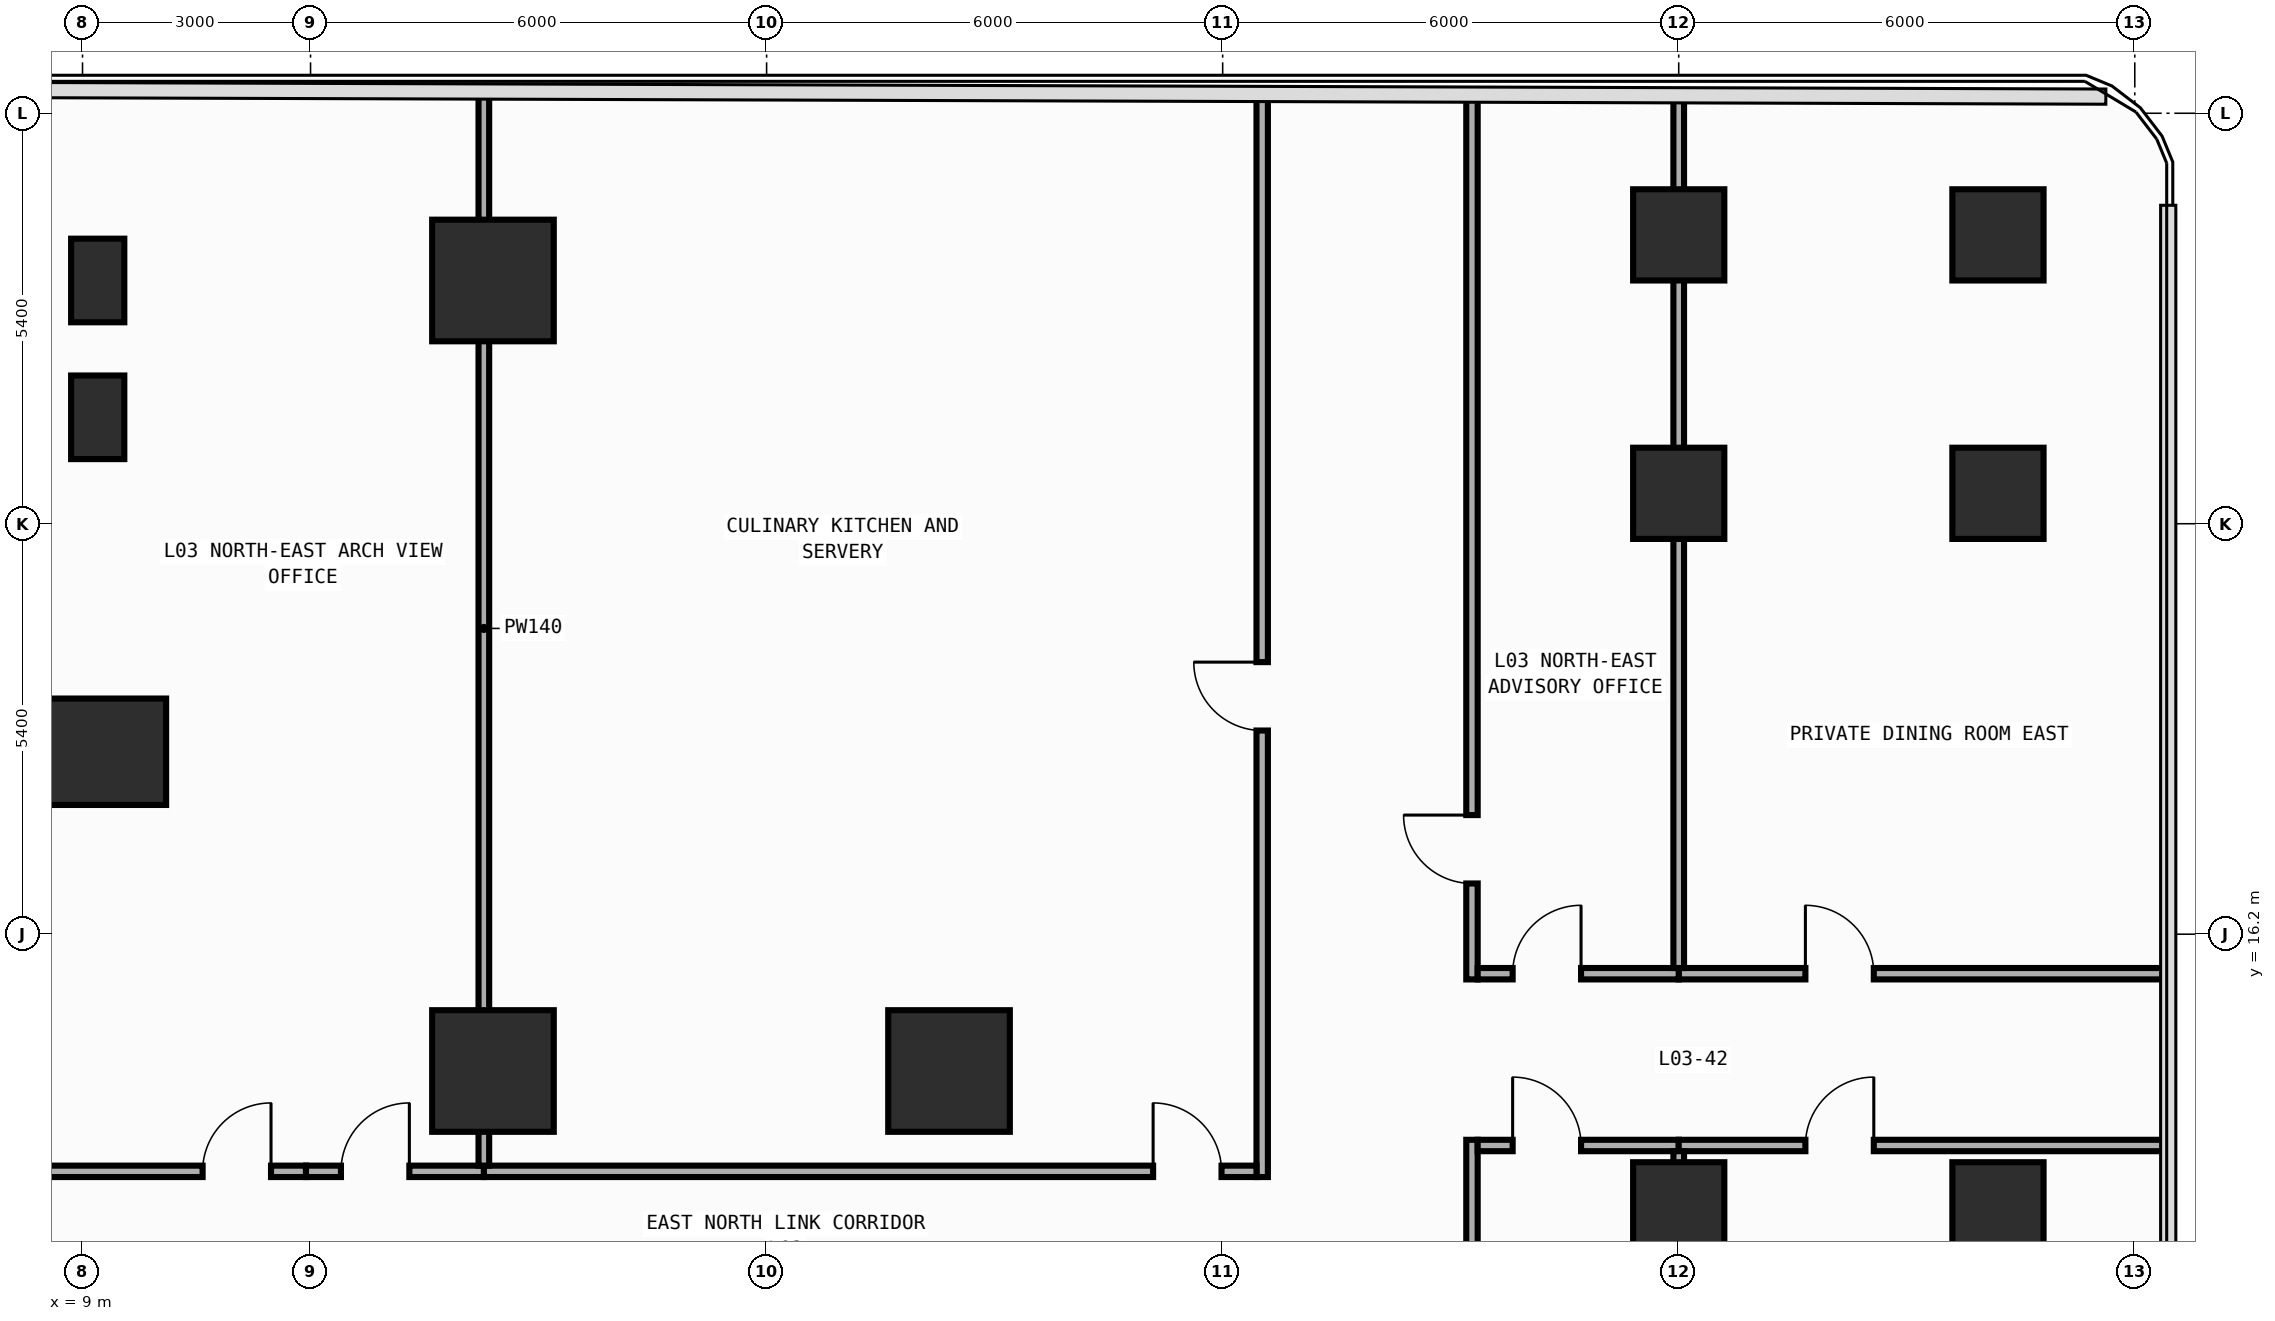
"""IFC4 building model, lengths in metres.
Left out: names, types, materials, properties, quantities, classifications, styles, units other than length and angle.
Written with IfcOpenShell. Run it as: python <this file> out.ifc"""

import sys

from ifc_helpers import new_model, si_unit, direction, frame, frame_2d, origin, origin_2d, place, context, subcontext, project, spatial, rectangle, extrude, element, fill, save


model = new_model("IFC4")
c1 = context("Model", 3, precision=1e-05, world=origin(), true_north=direction((0.0, 1.0)))
c2 = subcontext(c1, "Body", "Model", "MODEL_VIEW")
j1 = project(units=[si_unit("LENGTHUNIT", "METRE"), si_unit("PLANEANGLEUNIT", "RADIAN")], contexts=[c1])
p1 = place(None, origin())
s1 = spatial("IfcSite", under=j1, at=p1, CompositionType="ELEMENT")
p2 = place(p1, origin())
s2 = spatial("IfcBuilding", under=s1, at=p2, CompositionType="ELEMENT")
p3 = place(p2, frame((0.0, 0.0, 11.0)))
s3 = spatial("IfcBuildingStorey", under=s2, at=p3, CompositionType="ELEMENT", Elevation=11.0)
p4 = place(p3, frame((9.2, 18.6, 0.0), z_axis=(0.0, 0.0, 1.0), x_axis=(1.0, 0.0, 0.0)))
e1 = element("IfcColumn", 1, at=p4, inside=s3, PredefinedType="COLUMN", context=c2, shape_type="SweptSolid", body=[
    extrude(rectangle(XDim=1.8, YDim=1.4, at=origin_2d()), origin(), (0.0, 0.0, 1.0), 5.0),
])
for number, where, z_axis, x_axis in (
    (2, (20.4, 14.4, 0.0), (0.0, 0.0, 1.0), (1.0, 0.0, 0.0)),
    (3, (14.4, 14.4, 0.0), (0.0, 0.0, 1.0), (1.0, 0.0, 0.0)),
):
    element("IfcColumn", number, at=place(p3, frame(where, z_axis=z_axis, x_axis=x_axis)), inside=s3, PredefinedType="COLUMN", context=c2, shape_type="SweptSolid", body=[
        extrude(rectangle(XDim=1.6, YDim=1.6, at=origin_2d()), origin(), (0.0, 0.0, 1.0), 5.0),
    ])
for number, where, z_axis, x_axis in (
    (4, (30.0, 12.6, 0.0), (0.0, 0.0, 1.0), (1.0, 0.0, 0.0)),
    (5, (30.0, 22.0, 0.0), (0.0, 0.0, 1.0), (1.0, 0.0, 0.0)),
    (6, (30.0, 25.4, 0.0), (0.0, 0.0, 1.0), (1.0, 0.0, 0.0)),
    (7, (34.2, 12.6, 0.0), (0.0, 0.0, 1.0), (1.0, 0.0, 0.0)),
    (8, (34.2, 22.0, 0.0), (0.0, 0.0, 1.0), (1.0, 0.0, 0.0)),
    (9, (34.2, 25.4, 0.0), (0.0, 0.0, 1.0), (1.0, 0.0, 0.0)),
):
    element("IfcColumn", number, at=place(p3, frame(where, z_axis=z_axis, x_axis=x_axis)), inside=s3, PredefinedType="COLUMN", context=c2, shape_type="SweptSolid", body=[
        extrude(rectangle(XDim=1.2, YDim=1.2, at=origin_2d()), origin(), (0.0, 0.0, 1.0), 5.0),
    ])
p5 = place(p3, frame((9.2, 24.8, 0.0), z_axis=(0.0, 0.0, 1.0), x_axis=(1.0, 0.0, 0.0)))
e10 = element("IfcColumn", 10, at=p5, inside=s3, PredefinedType="PILASTER", context=c2, shape_type="SweptSolid", body=[
    extrude(rectangle(XDim=0.7, YDim=1.1, at=origin_2d()), origin(), (0.0, 0.0, 1.0), 5.0),
])
p6 = place(p3, frame((14.4, 24.8, 0.0), z_axis=(0.0, 0.0, 1.0), x_axis=(1.0, 0.0, 0.0)))
e11 = element("IfcColumn", 11, at=p6, inside=s3, PredefinedType="COLUMN", context=c2, shape_type="SweptSolid", body=[
    extrude(rectangle(XDim=1.6, YDim=1.6, at=origin_2d()), origin(), (0.0, 0.0, 1.0), 5.0),
])
p7 = place(p3, frame((9.2, 23.0, 0.0), z_axis=(0.0, 0.0, 1.0), x_axis=(1.0, 0.0, 0.0)))
e12 = element("IfcColumn", 12, at=p7, inside=s3, PredefinedType="PILASTER", context=c2, shape_type="SweptSolid", body=[
    extrude(rectangle(XDim=0.7, YDim=1.1, at=origin_2d()), origin(), (0.0, 0.0, 1.0), 5.0),
])
p8 = place(p3, frame((8.205, 13.08, 0.0), z_axis=(0.0, 0.0, 1.0), x_axis=(1.0, 0.0, 0.0)))
e13 = element("IfcWall", 13, at=p8, inside=s3, PredefinedType="PARTITIONING", context=c2, shape_type="SweptSolid", body=[
    extrude(rectangle(XDim=3.735, YDim=0.15, at=frame_2d((1.867, 0.0))), origin(), (0.0, 0.0, 1.0), 4.7),
])
p9 = place(p8, frame((2.375, 0.0, 0.0)))
e14 = element("IfcOpeningElement", 14, at=p9, cuts=e13, PredefinedType="OPENING", context=c2, shape_type="SweptSolid", body=[
    extrude(rectangle(XDim=0.9, YDim=2.15, at=frame_2d((0.45, 1.075))), frame((0.0, 0.085, 0.0), z_axis=(0.0, -1.0, 0.0), x_axis=(1.0, 0.0, 0.0)), (0.0, 0.0, 1.0), 0.17),
])
p10 = place(p3, frame((27.28, 5.365, 0.0), z_axis=(0.0, 0.0, 1.0), x_axis=(0.0, 1.0, 0.0)))
e15 = element("IfcWall", 15, at=p10, inside=s3, PredefinedType="PARTITIONING", context=c2, shape_type="SweptSolid", body=[
    extrude(rectangle(XDim=8.13, YDim=0.15, at=frame_2d((4.065, 0.0))), origin(), (0.0, 0.0, 1.0), 4.7),
])
p11 = place(p10, frame((3.31, 0.0, 0.0)))
e16 = element("IfcOpeningElement", 16, at=p11, cuts=e15, PredefinedType="OPENING", context=c2, shape_type="SweptSolid", body=[
    extrude(rectangle(XDim=0.9, YDim=2.15, at=frame_2d((0.45, 1.075))), frame((0.0, 0.085, 0.0), z_axis=(0.0, -1.0, 0.0), x_axis=(1.0, 0.0, 0.0)), (0.0, 0.0, 1.0), 0.17),
])
p12 = place(p3, frame((24.52, 13.005, 0.0), z_axis=(0.0, 0.0, 1.0), x_axis=(0.0, 1.0, 0.0)))
e17 = element("IfcWall", 17, at=p12, inside=s3, PredefinedType="PARTITIONING", context=c2, shape_type="SweptSolid", body=[
    extrude(rectangle(XDim=14.253, YDim=0.15, at=frame_2d((7.126, 0.0))), origin(), (0.0, 0.0, 1.0), 4.7),
])
p13 = place(p12, frame((5.874, 0.0, 0.0)))
e18 = element("IfcOpeningElement", 18, at=p13, cuts=e17, PredefinedType="OPENING", context=c2, shape_type="SweptSolid", body=[
    extrude(rectangle(XDim=0.9, YDim=2.15, at=frame_2d((0.45, 1.075))), frame((0.0, 0.085, 0.0), z_axis=(0.0, -1.0, 0.0), x_axis=(1.0, 0.0, 0.0)), (0.0, 0.0, 1.0), 0.17),
])
p14 = place(p3, frame((27.28, 15.605, 0.0), z_axis=(0.0, 0.0, 1.0), x_axis=(0.0, 1.0, 0.0)))
e19 = element("IfcWall", 19, at=p14, inside=s3, PredefinedType="PARTITIONING", context=c2, shape_type="SweptSolid", body=[
    extrude(rectangle(XDim=11.644, YDim=0.15, at=frame_2d((5.822, 0.0))), origin(), (0.0, 0.0, 1.0), 4.7),
])
p15 = place(p14, frame((1.262, 0.0, 0.0)))
e20 = element("IfcOpeningElement", 20, at=p15, cuts=e19, PredefinedType="OPENING", context=c2, shape_type="SweptSolid", body=[
    extrude(rectangle(XDim=0.9, YDim=2.15, at=frame_2d((0.45, 1.075))), frame((0.0, 0.085, 0.0), z_axis=(0.0, -1.0, 0.0), x_axis=(1.0, 0.0, 0.0)), (0.0, 0.0, 1.0), 0.17),
])
p16 = place(p3, frame((27.355, 13.42, 0.0), z_axis=(0.0, 0.0, 1.0), x_axis=(1.0, 0.0, 0.0)))
e21 = element("IfcWall", 21, at=p16, inside=s3, PredefinedType="PARTITIONING", context=c2, shape_type="SweptSolid", body=[
    extrude(rectangle(XDim=2.645, YDim=0.15, at=frame_2d((1.323, 0.0))), origin(), (0.0, 0.0, 1.0), 4.7),
])
p17 = place(p16, frame((0.46, 0.0, 0.0)))
e22 = element("IfcOpeningElement", 22, at=p17, cuts=e21, PredefinedType="OPENING", context=c2, shape_type="SweptSolid", body=[
    extrude(rectangle(XDim=0.9, YDim=2.15, at=frame_2d((0.45, 1.075))), frame((0.0, 0.085, 0.0), z_axis=(0.0, -1.0, 0.0), x_axis=(1.0, 0.0, 0.0)), (0.0, 0.0, 1.0), 0.17),
])
p18 = place(p3, frame((30.0, 13.42, 0.0), z_axis=(0.0, 0.0, 1.0), x_axis=(1.0, 0.0, 0.0)))
e23 = element("IfcWall", 23, at=p18, inside=s3, PredefinedType="PARTITIONING", context=c2, shape_type="SweptSolid", body=[
    extrude(rectangle(XDim=6.445, YDim=0.15, at=frame_2d((3.223, 0.0))), origin(), (0.0, 0.0, 1.0), 4.7),
])
p19 = place(p18, frame((1.667, 0.0, 0.0)))
e24 = element("IfcOpeningElement", 24, at=p19, cuts=e23, PredefinedType="OPENING", context=c2, shape_type="SweptSolid", body=[
    extrude(rectangle(XDim=0.9, YDim=2.15, at=frame_2d((0.45, 1.075))), frame((0.0, 0.085, 0.0), z_axis=(0.0, -1.0, 0.0), x_axis=(1.0, 0.0, 0.0)), (0.0, 0.0, 1.0), 0.17),
])
p20 = place(p3, frame((30.0, 15.68, 0.0), z_axis=(0.0, 0.0, 1.0), x_axis=(1.0, 0.0, 0.0)))
e25 = element("IfcWall", 25, at=p20, inside=s3, PredefinedType="PARTITIONING", context=c2, shape_type="SweptSolid", body=[
    extrude(rectangle(XDim=6.445, YDim=0.15, at=frame_2d((3.223, 0.0))), origin(), (0.0, 0.0, 1.0), 4.7),
])
p21 = place(p20, frame((1.667, 0.0, 0.0)))
e26 = element("IfcOpeningElement", 26, at=p21, cuts=e25, PredefinedType="OPENING", context=c2, shape_type="SweptSolid", body=[
    extrude(rectangle(XDim=0.9, YDim=2.15, at=frame_2d((0.45, 1.075))), frame((0.0, 0.085, 0.0), z_axis=(0.0, -1.0, 0.0), x_axis=(1.0, 0.0, 0.0)), (0.0, 0.0, 1.0), 0.17),
])
p22 = place(p3, frame((27.355, 15.68, 0.0), z_axis=(0.0, 0.0, 1.0), x_axis=(1.0, 0.0, 0.0)))
e27 = element("IfcWall", 27, at=p22, inside=s3, PredefinedType="PARTITIONING", context=c2, shape_type="SweptSolid", body=[
    extrude(rectangle(XDim=2.645, YDim=0.15, at=frame_2d((1.323, 0.0))), origin(), (0.0, 0.0, 1.0), 4.7),
])
p23 = place(p22, frame((0.46, 0.0, 0.0)))
e28 = element("IfcOpeningElement", 28, at=p23, cuts=e27, PredefinedType="OPENING", context=c2, shape_type="SweptSolid", body=[
    extrude(rectangle(XDim=0.9, YDim=2.15, at=frame_2d((0.45, 1.075))), frame((0.0, 0.085, 0.0), z_axis=(0.0, -1.0, 0.0), x_axis=(1.0, 0.0, 0.0)), (0.0, 0.0, 1.0), 0.17),
])
p24 = place(p3, frame((14.28, 13.08, 0.0), z_axis=(0.0, 0.0, 1.0), x_axis=(1.0, 0.0, 0.0)))
e29 = element("IfcWall", 29, at=p24, inside=s3, PredefinedType="PARTITIONING", context=c2, shape_type="SweptSolid", body=[
    extrude(rectangle(XDim=10.165, YDim=0.15, at=frame_2d((5.083, 0.0))), origin(), (0.0, 0.0, 1.0), 4.7),
])
p25 = place(p24, frame((8.805, 0.0, 0.0)))
e30 = element("IfcOpeningElement", 30, at=p25, cuts=e29, PredefinedType="OPENING", context=c2, shape_type="SweptSolid", body=[
    extrude(rectangle(XDim=0.9, YDim=2.15, at=frame_2d((0.45, 1.075))), frame((0.0, 0.085, 0.0), z_axis=(0.0, -1.0, 0.0), x_axis=(1.0, 0.0, 0.0)), (0.0, 0.0, 1.0), 0.17),
])
p26 = place(p3, frame((11.94, 13.08, 0.0), z_axis=(0.0, 0.0, 1.0), x_axis=(1.0, 0.0, 0.0)))
e31 = element("IfcWall", 31, at=p26, inside=s3, PredefinedType="PARTITIONING", context=c2, shape_type="SweptSolid", body=[
    extrude(rectangle(XDim=2.34, YDim=0.15, at=frame_2d((1.17, 0.0))), origin(), (0.0, 0.0, 1.0), 4.7),
])
p27 = place(p26, frame((0.46, 0.0, 0.0)))
e32 = element("IfcOpeningElement", 32, at=p27, cuts=e31, PredefinedType="OPENING", context=c2, shape_type="SweptSolid", body=[
    extrude(rectangle(XDim=0.9, YDim=2.15, at=frame_2d((0.45, 1.075))), frame((0.0, 0.085, 0.0), z_axis=(0.0, -1.0, 0.0), x_axis=(1.0, 0.0, 0.0)), (0.0, 0.0, 1.0), 0.17),
])
p28 = place(p3, frame((30.0, 5.515, 0.0), z_axis=(0.0, 0.0, 1.0), x_axis=(0.0, 1.0, 0.0)))
e33 = element("IfcWall", 33, at=p28, inside=s3, PredefinedType="PARTITIONING", context=c2, shape_type="SweptSolid", body=[
    extrude(rectangle(XDim=7.83, YDim=0.14, at=frame_2d((3.915, 0.0))), origin(), (0.0, 0.0, 1.0), 3.8),
])
p29 = place(p3, frame((30.0, 15.755, 0.0), z_axis=(0.0, 0.0, 1.0), x_axis=(0.0, 1.0, 0.0)))
e34 = element("IfcWall", 34, at=p29, inside=s3, PredefinedType="PARTITIONING", context=c2, shape_type="SweptSolid", body=[
    extrude(rectangle(XDim=11.486, YDim=0.14, at=frame_2d((5.743, 0.0))), origin(), (0.0, 0.0, 1.0), 3.8),
])
p30 = place(p3, frame((14.28, 13.155, 0.0), z_axis=(0.0, 0.0, 1.0), x_axis=(0.0, 1.0, 0.0)))
e35 = element("IfcWall", 35, at=p30, inside=s3, PredefinedType="PARTITIONING", context=c2, shape_type="SweptSolid", body=[
    extrude(rectangle(XDim=14.135, YDim=0.14, at=frame_2d((7.067, 0.0))), origin(), (0.0, 0.0, 1.0), 3.8),
])
p31 = place(p9, origin())
e36 = element("IfcDoor", 36, at=p31, inside=s3, OperationType="SINGLE_SWING_RIGHT", PredefinedType="DOOR", context=c2, shape_type="SweptSolid", body=[
    extrude(rectangle(XDim=0.9, YDim=2.15, at=frame_2d((0.45, 1.075))), frame((0.0, 0.025, 0.0), z_axis=(0.0, -1.0, 0.0), x_axis=(1.0, 0.0, 0.0)), (0.0, 0.0, 1.0), 0.05),
])
fill(e14, e36)
p32 = place(p13, origin())
e37 = element("IfcDoor", 37, at=p32, inside=s3, OperationType="SINGLE_SWING_RIGHT", PredefinedType="DOOR", context=c2, shape_type="SweptSolid", body=[
    extrude(rectangle(XDim=0.9, YDim=2.15, at=frame_2d((0.45, 1.075))), frame((0.0, 0.025, 0.0), z_axis=(0.0, -1.0, 0.0), x_axis=(1.0, 0.0, 0.0)), (0.0, 0.0, 1.0), 0.05),
])
fill(e18, e37)
p33 = place(p15, origin())
e38 = element("IfcDoor", 38, at=p33, inside=s3, OperationType="SINGLE_SWING_RIGHT", PredefinedType="DOOR", context=c2, shape_type="SweptSolid", body=[
    extrude(rectangle(XDim=0.9, YDim=2.15, at=frame_2d((0.45, 1.075))), frame((0.0, 0.025, 0.0), z_axis=(0.0, -1.0, 0.0), x_axis=(1.0, 0.0, 0.0)), (0.0, 0.0, 1.0), 0.05),
])
fill(e20, e38)
p34 = place(p17, origin())
e39 = element("IfcDoor", 39, at=p34, inside=s3, OperationType="SINGLE_SWING_LEFT", PredefinedType="DOOR", context=c2, shape_type="SweptSolid", body=[
    extrude(rectangle(XDim=0.9, YDim=2.15, at=frame_2d((0.45, 1.075))), frame((0.0, 0.025, 0.0), z_axis=(0.0, -1.0, 0.0), x_axis=(1.0, 0.0, 0.0)), (0.0, 0.0, 1.0), 0.05),
])
fill(e22, e39)
p35 = place(p19, origin())
e40 = element("IfcDoor", 40, at=p35, inside=s3, OperationType="SINGLE_SWING_RIGHT", PredefinedType="DOOR", context=c2, shape_type="SweptSolid", body=[
    extrude(rectangle(XDim=0.9, YDim=2.15, at=frame_2d((0.45, 1.075))), frame((0.0, 0.025, 0.0), z_axis=(0.0, -1.0, 0.0), x_axis=(1.0, 0.0, 0.0)), (0.0, 0.0, 1.0), 0.05),
])
fill(e24, e40)
p36 = place(p21, origin())
e41 = element("IfcDoor", 41, at=p36, inside=s3, OperationType="SINGLE_SWING_LEFT", PredefinedType="DOOR", context=c2, shape_type="SweptSolid", body=[
    extrude(rectangle(XDim=0.9, YDim=2.15, at=frame_2d((0.45, 1.075))), frame((0.0, 0.025, 0.0), z_axis=(0.0, -1.0, 0.0), x_axis=(1.0, 0.0, 0.0)), (0.0, 0.0, 1.0), 0.05),
])
fill(e26, e41)
p37 = place(p23, origin())
e42 = element("IfcDoor", 42, at=p37, inside=s3, OperationType="SINGLE_SWING_RIGHT", PredefinedType="DOOR", context=c2, shape_type="SweptSolid", body=[
    extrude(rectangle(XDim=0.9, YDim=2.15, at=frame_2d((0.45, 1.075))), frame((0.0, 0.025, 0.0), z_axis=(0.0, -1.0, 0.0), x_axis=(1.0, 0.0, 0.0)), (0.0, 0.0, 1.0), 0.05),
])
fill(e28, e42)
p38 = place(p25, origin())
e43 = element("IfcDoor", 43, at=p38, inside=s3, OperationType="SINGLE_SWING_LEFT", PredefinedType="DOOR", context=c2, shape_type="SweptSolid", body=[
    extrude(rectangle(XDim=0.9, YDim=2.15, at=frame_2d((0.45, 1.075))), frame((0.0, 0.025, 0.0), z_axis=(0.0, -1.0, 0.0), x_axis=(1.0, 0.0, 0.0)), (0.0, 0.0, 1.0), 0.05),
])
fill(e30, e43)
p39 = place(p27, origin())
e44 = element("IfcDoor", 44, at=p39, inside=s3, OperationType="SINGLE_SWING_RIGHT", PredefinedType="DOOR", context=c2, shape_type="SweptSolid", body=[
    extrude(rectangle(XDim=0.9, YDim=2.15, at=frame_2d((0.45, 1.075))), frame((0.0, 0.025, 0.0), z_axis=(0.0, -1.0, 0.0), x_axis=(1.0, 0.0, 0.0)), (0.0, 0.0, 1.0), 0.05),
])
fill(e32, e44)
save(model, sys.argv[1])
